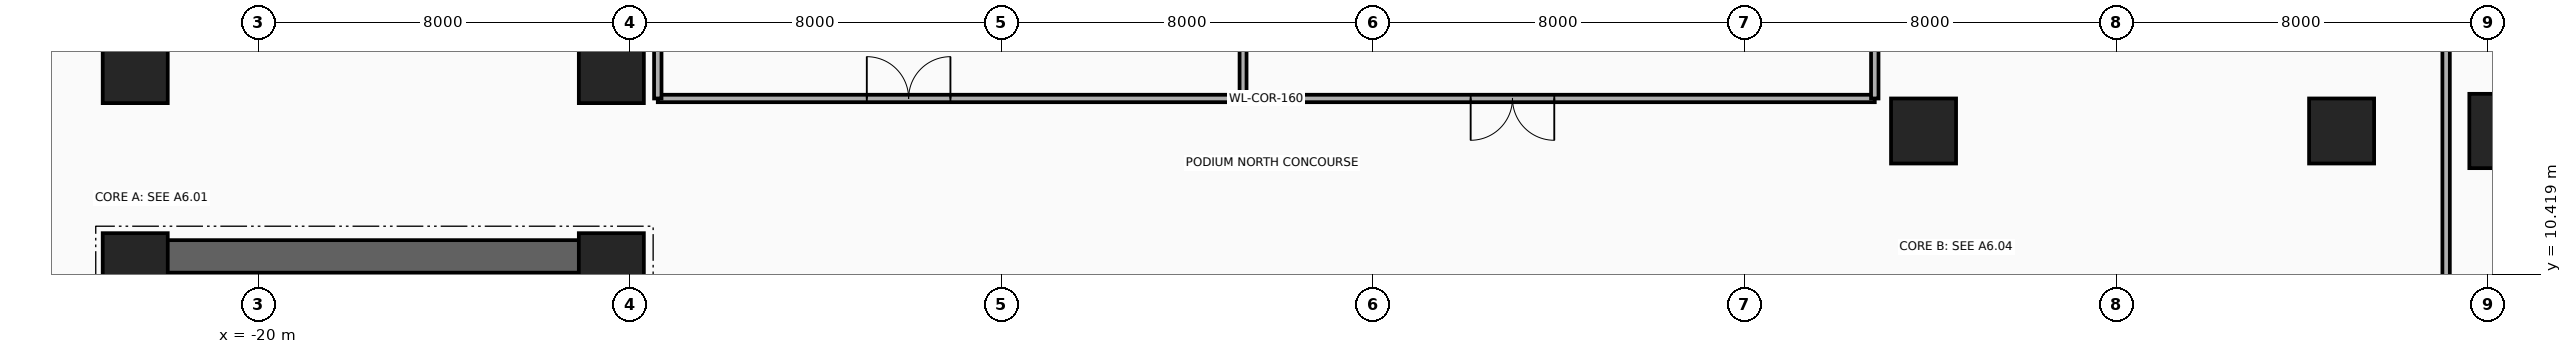
"""IFC4 building model, lengths in metres.
Left out: names, types, materials, properties, quantities, classifications, styles, units other than length and angle.
Written with IfcOpenShell. Run it as: python <this file> out.ifc"""

import sys

from ifc_helpers import new_model, si_unit, direction, frame, frame_2d, origin, origin_2d, place, context, subcontext, project, spatial, rectangle, extrude, source, transform, mapped, element, fill, save


model = new_model("IFC4")
c1 = context("Model", 3, precision=1e-05, world=origin(), true_north=direction((0.0, 1.0)))
c2 = subcontext(c1, "Body", "Model", "MODEL_VIEW")
j1 = project(units=[si_unit("LENGTHUNIT", "METRE"), si_unit("PLANEANGLEUNIT", "RADIAN")], contexts=[c1])
p1 = place(None, origin())
s1 = spatial("IfcSite", under=j1, at=p1, CompositionType="ELEMENT")
p2 = place(p1, origin())
s2 = spatial("IfcBuilding", under=s1, at=p2, CompositionType="ELEMENT")
p3 = place(p2, frame((0.0, 0.0, 5.2)))
s3 = spatial("IfcBuildingStorey", under=s2, at=p3, CompositionType="ELEMENT", Elevation=5.2)
for number, where, z_axis, x_axis in (
    (1, (-22.16, 1.78, 0.0), (0.0, 0.0, 1.0), (0.0, 1.0, 0.0)),
    (2, (-18.83, 1.78, 0.0), (0.0, 0.0, 1.0), (0.0, 1.0, 0.0)),
):
    element("IfcWall", number, at=place(p3, frame(where, z_axis=z_axis, x_axis=x_axis)), inside=s3, PredefinedType="SHEAR", context=c2, shape_type="SweptSolid", body=[
        extrude(rectangle(XDim=8.67, YDim=0.22, at=frame_2d((4.335, 0.0))), origin(), (0.0, 0.0, 1.0), 4.92),
    ])
p4 = place(p3, frame((-22.65, -11.15, 0.0), z_axis=(0.0, 0.0, 1.0), x_axis=(0.0, 1.0, 0.0)))
e3 = element("IfcWall", 3, at=p4, inside=s3, PredefinedType="SHEAR", context=c2, shape_type="SweptSolid", body=[
    extrude(rectangle(XDim=22.3, YDim=0.7, at=frame_2d((11.15, 0.0))), origin(), (0.0, 0.0, 1.0), 4.92),
])
p5 = place(p3, frame((-22.65, 10.8, 0.0), z_axis=(0.0, 0.0, 1.0), x_axis=(1.0, 0.0, 0.0)))
e4 = element("IfcWall", 4, at=p5, inside=s3, PredefinedType="SHEAR", context=c2, shape_type="SweptSolid", body=[
    extrude(rectangle(XDim=10.25, YDim=0.7, at=frame_2d((5.125, 0.0))), origin(), (0.0, 0.0, 1.0), 4.92),
])
m1 = source(origin(), c2, "Body", "SweptSolid", [
    extrude(rectangle(XDim=1.4, YDim=1.4, at=origin_2d()), origin(), (0.0, 0.0, 1.0), 5.2),
])
for number, where, z_axis, x_axis in (
    (5, (-22.65, 10.6, 0.0), (0.0, 0.0, 1.0), (1.0, 0.0, 0.0)),
    (6, (-12.4, 10.6, 0.0), (0.0, 0.0, 1.0), (1.0, 0.0, 0.0)),
    (7, (-22.65, 14.8, 0.0), (0.0, 0.0, 1.0), (1.0, 0.0, 0.0)),
    (8, (-12.4, 14.8, 0.0), (0.0, 0.0, 1.0), (1.0, 0.0, 0.0)),
    (9, (15.85, 13.5, 0.0), (0.0, 0.0, 1.0), (1.0, 0.0, 0.0)),
    (10, (24.85, 13.5, 0.0), (0.0, 0.0, 1.0), (1.0, 0.0, 0.0)),
):
    element("IfcColumn", number, at=place(p3, frame(where, z_axis=z_axis, x_axis=x_axis)), inside=s3, PredefinedType="COLUMN", context=c2, shape_type="MappedRepresentation", body=[
        mapped(m1, transform((0.0, 0.0, 0.0), x_axis=(1.0, 0.0, 0.0), y_axis=(0.0, 1.0, 0.0), z_axis=(0.0, 0.0, 1.0), scale=1.0)),
    ])
m2 = source(origin(), c2, "Body", "SweptSolid", [
    extrude(rectangle(XDim=1.6, YDim=1.6, at=origin_2d()), origin(), (0.0, 0.0, 1.0), 5.2),
])
p6 = place(p3, frame((28.4, 13.5, 0.0), z_axis=(0.0, 0.0, 1.0), x_axis=(1.0, 0.0, 0.0)))
e11 = element("IfcColumn", 11, at=p6, inside=s3, PredefinedType="COLUMN", context=c2, shape_type="MappedRepresentation", body=[
    mapped(m2, transform((0.0, 0.0, 0.0), x_axis=(1.0, 0.0, 0.0), y_axis=(0.0, 1.0, 0.0), z_axis=(0.0, 0.0, 1.0), scale=1.0)),
])
p7 = place(p3, frame((-11.4, 14.2, 0.0), z_axis=(0.0, 0.0, 1.0), x_axis=(1.0, 0.0, 0.0)))
e12 = element("IfcWall", 12, at=p7, inside=s3, PredefinedType="PARTITIONING", context=c2, shape_type="SweptSolid", body=[
    extrude(rectangle(XDim=26.2, YDim=0.16, at=frame_2d((13.1, 0.0))), origin(), (0.0, 0.0, 1.0), 4.92),
])
p8 = place(p7, frame((4.5, 0.0, 0.0)))
e13 = element("IfcOpeningElement", 13, at=p8, cuts=e12, PredefinedType="OPENING", context=c2, shape_type="SweptSolid", body=[
    extrude(rectangle(XDim=1.8, YDim=2.15, at=frame_2d((0.9, 1.075))), frame((0.0, 0.095, 0.0), z_axis=(0.0, -1.0, 0.0), x_axis=(1.0, 0.0, 0.0)), (0.0, 0.0, 1.0), 0.19),
])
p9 = place(p7, frame((17.5, 0.0, 0.0)))
e14 = element("IfcOpeningElement", 14, at=p9, cuts=e12, PredefinedType="OPENING", context=c2, shape_type="SweptSolid", body=[
    extrude(rectangle(XDim=1.8, YDim=2.15, at=frame_2d((0.9, 1.075))), frame((0.0, 0.095, 0.0), z_axis=(0.0, -1.0, 0.0), x_axis=(1.0, 0.0, 0.0)), (0.0, 0.0, 1.0), 0.19),
])
for number, where, z_axis, x_axis in (
    (15, (-11.4, 14.2, 0.0), (0.0, 0.0, 1.0), (0.0, 1.0, 0.0)),
    (16, (14.8, 14.2, 0.0), (0.0, 0.0, 1.0), (0.0, 1.0, 0.0)),
):
    element("IfcWall", number, at=place(p3, frame(where, z_axis=z_axis, x_axis=x_axis)), inside=s3, PredefinedType="PARTITIONING", context=c2, shape_type="SweptSolid", body=[
        extrude(rectangle(XDim=8.54, YDim=0.16, at=frame_2d((4.27, 0.0))), origin(), (0.0, 0.0, 1.0), 3.957),
    ])
p10 = place(p3, frame((1.2, 14.2, 0.0), z_axis=(0.0, 0.0, 1.0), x_axis=(0.0, 1.0, 0.0)))
e17 = element("IfcWall", 17, at=p10, inside=s3, PredefinedType="PARTITIONING", context=c2, shape_type="SweptSolid", body=[
    extrude(rectangle(XDim=8.54, YDim=0.15, at=frame_2d((4.27, 0.0))), origin(), (0.0, 0.0, 1.0), 3.957),
])
p11 = place(p3, frame((27.1, -22.74, 0.0), z_axis=(0.0, 0.0, 1.0), x_axis=(0.0, 1.0, 0.0)))
e18 = element("IfcWall", 18, at=p11, inside=s3, PredefinedType="PARTITIONING", context=c2, shape_type="SweptSolid", body=[
    extrude(rectangle(XDim=45.48, YDim=0.16, at=frame_2d((22.74, 0.0))), origin(), (0.0, 0.0, 1.0), 3.957),
])
p12 = place(p11, frame((7.0, 0.0, 0.0)))
e19 = element("IfcOpeningElement", 19, at=p12, cuts=e18, PredefinedType="OPENING", context=c2, shape_type="SweptSolid", body=[
    extrude(rectangle(XDim=1.8, YDim=2.15, at=frame_2d((0.9, 1.075))), frame((0.0, 0.095, 0.0), z_axis=(0.0, -1.0, 0.0), x_axis=(1.0, 0.0, 0.0)), (0.0, 0.0, 1.0), 0.19),
])
p13 = place(p11, frame((25.0, 0.0, 0.0)))
e20 = element("IfcOpeningElement", 20, at=p13, cuts=e18, PredefinedType="OPENING", context=c2, shape_type="SweptSolid", body=[
    extrude(rectangle(XDim=1.8, YDim=2.15, at=frame_2d((0.9, 1.075))), frame((0.0, 0.095, 0.0), z_axis=(0.0, -1.0, 0.0), x_axis=(1.0, 0.0, 0.0)), (0.0, 0.0, 1.0), 0.19),
])
p14 = place(p8, origin())
e21 = element("IfcDoor", 21, at=p14, inside=s3, OperationType="DOUBLE_DOOR_SINGLE_SWING", PredefinedType="DOOR", context=c2, shape_type="SweptSolid", body=[
    extrude(rectangle(XDim=1.8, YDim=2.15, at=frame_2d((0.9, 1.075))), frame((0.0, 0.025, 0.0), z_axis=(0.0, -1.0, 0.0), x_axis=(1.0, 0.0, 0.0)), (0.0, 0.0, 1.0), 0.05),
])
fill(e13, e21)
p15 = place(p9, frame((1.8, 0.0, 0.0), z_axis=(0.0, 0.0, 1.0), x_axis=(-1.0, 0.0, 0.0)))
e22 = element("IfcDoor", 22, at=p15, inside=s3, OperationType="DOUBLE_DOOR_SINGLE_SWING", PredefinedType="DOOR", context=c2, shape_type="SweptSolid", body=[
    extrude(rectangle(XDim=1.8, YDim=2.15, at=frame_2d((0.9, 1.075))), frame((0.0, 0.025, 0.0), z_axis=(0.0, -1.0, 0.0), x_axis=(1.0, 0.0, 0.0)), (0.0, 0.0, 1.0), 0.05),
])
fill(e14, e22)
save(model, sys.argv[1])
